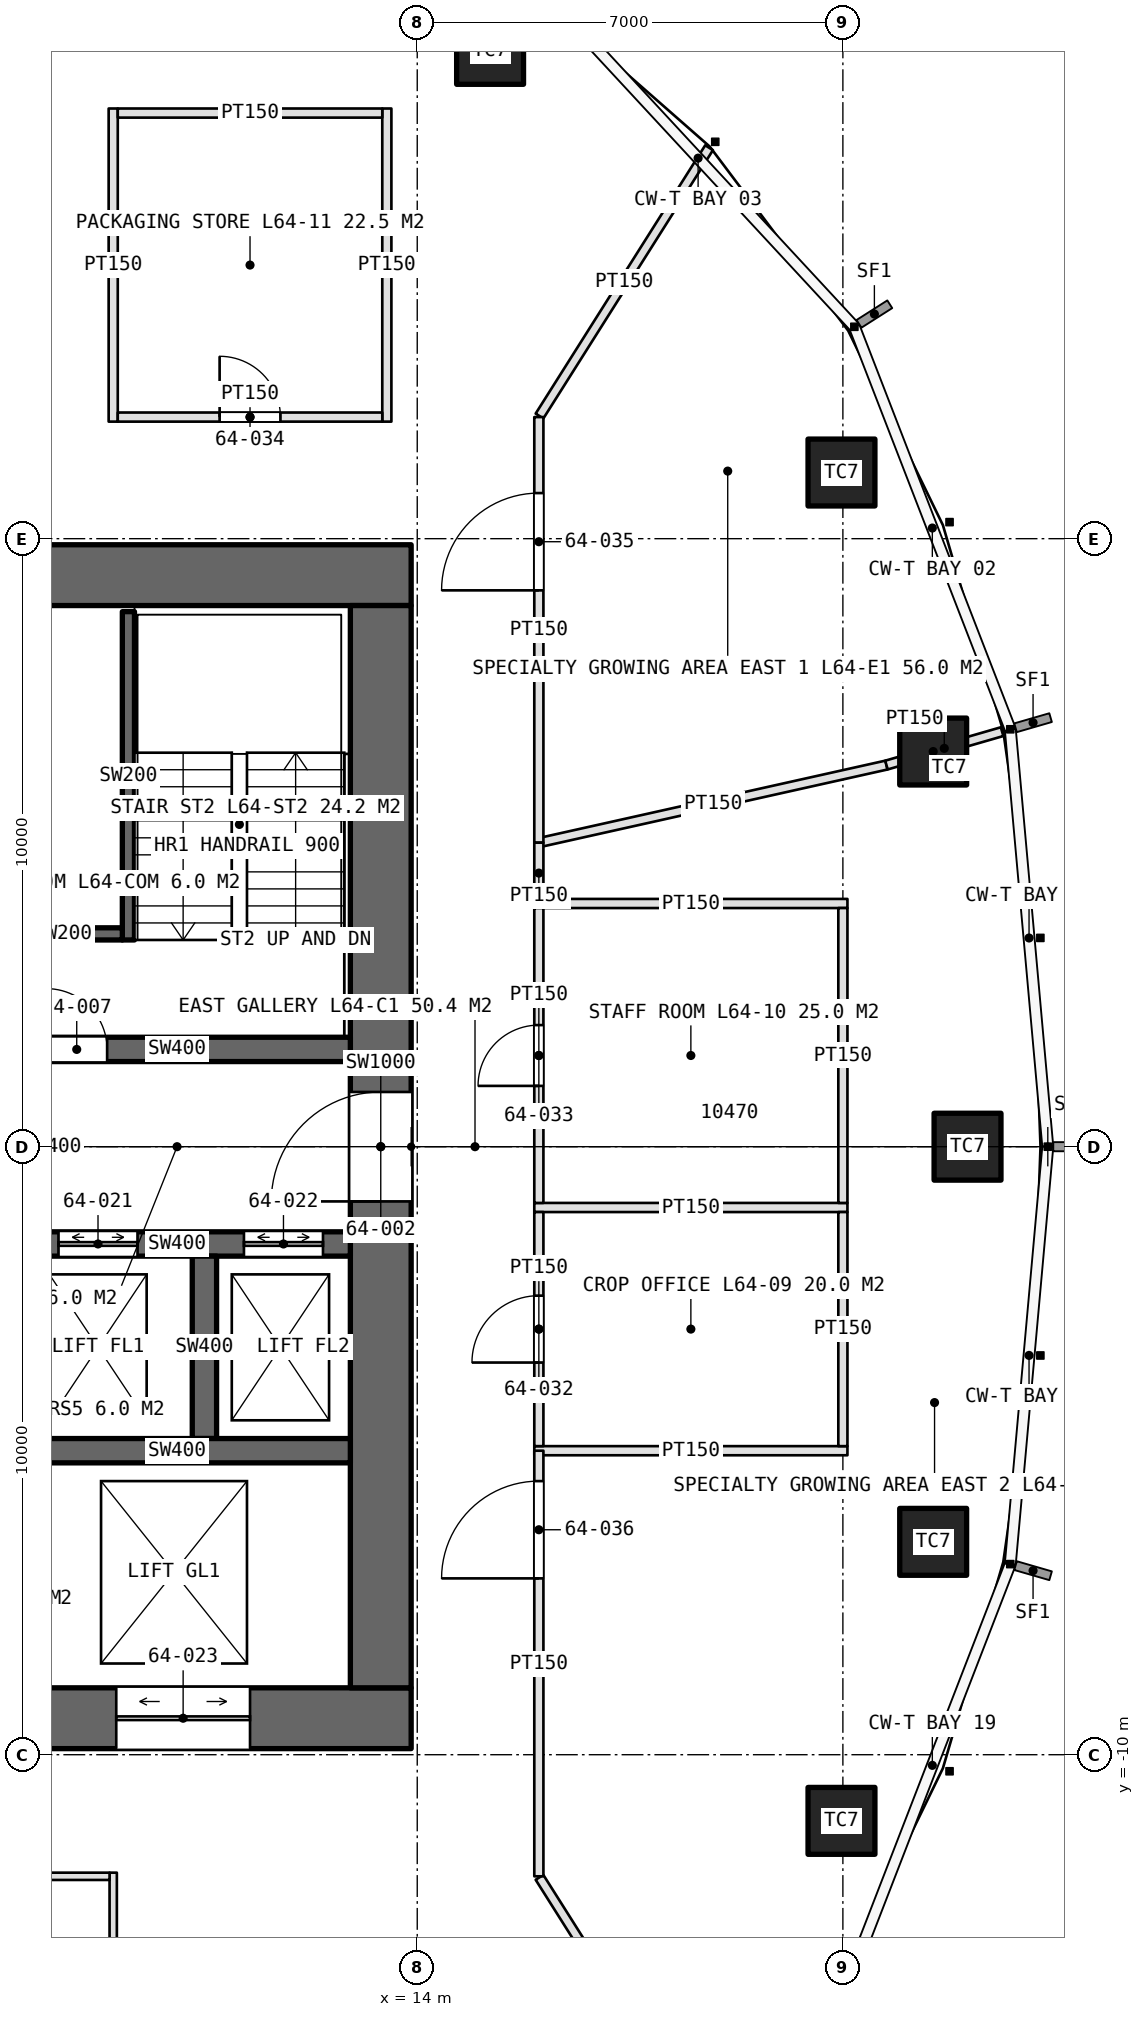
"""IFC4 building model, lengths in metres.
Left out: names, types, materials, properties, quantities, classifications, styles, units other than length and angle.
Written with IfcOpenShell. Run it as: python <this file> out.ifc"""

import sys

from ifc_helpers import new_model, si_unit, direction, frame, frame_2d, origin, origin_2d, place, context, subcontext, project, spatial, rectangle, extrude, element, fill, save


model = new_model("IFC4")
c1 = context("Model", 3, precision=1e-05, world=origin(), true_north=direction((0.0, 1.0)))
c2 = subcontext(c1, "Body", "Model", "MODEL_VIEW")
j1 = project(units=[si_unit("LENGTHUNIT", "METRE"), si_unit("PLANEANGLEUNIT", "RADIAN")], contexts=[c1])
p1 = place(None, origin())
s1 = spatial("IfcSite", under=j1, at=p1, CompositionType="ELEMENT")
p2 = place(p1, origin())
s2 = spatial("IfcBuilding", under=s1, at=p2, CompositionType="ELEMENT")
p3 = place(p2, frame((0.0, 0.0, 288.0)))
s3 = spatial("IfcBuildingStorey", under=s2, at=p3, CompositionType="ELEMENT", Elevation=288.0)
p4 = place(p3, frame((-13.9, -9.4, 0.0), z_axis=(0.0, 0.0, 1.0), x_axis=(1.0, 0.0, 0.0)))
e1 = element("IfcWall", 1, at=p4, inside=s3, PredefinedType="SHEAR", context=c2, shape_type="SweptSolid", body=[
    extrude(rectangle(XDim=27.8, YDim=1.0, at=frame_2d((13.9, 0.0))), origin(), (0.0, 0.0, 1.0), 4.2),
])
p5 = place(p4, frame((22.95, 0.0, 0.0)))
e2 = element("IfcOpeningElement", 2, at=p5, cuts=e1, PredefinedType="OPENING", context=c2, shape_type="SweptSolid", body=[
    extrude(rectangle(XDim=2.2, YDim=2.7, at=frame_2d((1.1, 1.35))), frame((0.0, 0.51, 0.0), z_axis=(0.0, -1.0, 0.0), x_axis=(1.0, 0.0, 0.0)), (0.0, 0.0, 1.0), 1.02),
])
p6 = place(p3, frame((13.9, 9.4, 0.0), z_axis=(0.0, 0.0, 1.0), x_axis=(-1.0, 0.0, 0.0)))
e3 = element("IfcWall", 3, at=p6, inside=s3, PredefinedType="SHEAR", context=c2, shape_type="SweptSolid", body=[
    extrude(rectangle(XDim=27.8, YDim=1.0, at=frame_2d((13.9, 0.0))), origin(), (0.0, 0.0, 1.0), 4.2),
])
p7 = place(p6, frame((23.9, 0.0, 0.0)))
e4 = element("IfcOpeningElement", 4, at=p7, cuts=e3, PredefinedType="OPENING", context=c2, shape_type="SweptSolid", body=[
    extrude(rectangle(XDim=1.0, YDim=2.4, at=frame_2d((0.5, 1.2))), frame((0.0, 0.51, 0.0), z_axis=(0.0, -1.0, 0.0), x_axis=(1.0, 0.0, 0.0)), (0.0, 0.0, 1.0), 1.02),
])
p8 = place(p6, frame((13.0, 0.0, 0.0)))
e5 = element("IfcOpeningElement", 5, at=p8, cuts=e3, PredefinedType="OPENING", context=c2, shape_type="SweptSolid", body=[
    extrude(rectangle(XDim=1.8, YDim=2.4, at=frame_2d((0.9, 1.2))), frame((0.0, 0.51, 0.0), z_axis=(0.0, -1.0, 0.0), x_axis=(1.0, 0.0, 0.0)), (0.0, 0.0, 1.0), 1.02),
])
p9 = place(p3, frame((13.4, -8.9, 0.0), z_axis=(0.0, 0.0, 1.0), x_axis=(0.0, 1.0, 0.0)))
e6 = element("IfcWall", 6, at=p9, inside=s3, PredefinedType="SHEAR", context=c2, shape_type="SweptSolid", body=[
    extrude(rectangle(XDim=17.8, YDim=1.0, at=frame_2d((8.9, 0.0))), origin(), (0.0, 0.0, 1.0), 4.2),
])
p10 = place(p9, frame((8.0, 0.0, 0.0)))
e7 = element("IfcOpeningElement", 7, at=p10, cuts=e6, PredefinedType="OPENING", context=c2, shape_type="SweptSolid", body=[
    extrude(rectangle(XDim=1.8, YDim=2.4, at=frame_2d((0.9, 1.2))), frame((0.0, 0.51, 0.0), z_axis=(0.0, -1.0, 0.0), x_axis=(1.0, 0.0, 0.0)), (0.0, 0.0, 1.0), 1.02),
])
p11 = place(p3, frame((7.2, 1.6, 0.0), z_axis=(0.0, 0.0, 1.0), x_axis=(1.0, 0.0, 0.0)))
e8 = element("IfcWall", 8, at=p11, inside=s3, PredefinedType="SHEAR", context=c2, shape_type="SweptSolid", body=[
    extrude(rectangle(XDim=5.7, YDim=0.4, at=frame_2d((2.85, 0.0))), origin(), (0.0, 0.0, 1.0), 4.2),
])
p12 = place(p11, frame((0.7, 0.0, 0.0)))
e9 = element("IfcOpeningElement", 9, at=p12, cuts=e8, PredefinedType="OPENING", context=c2, shape_type="SweptSolid", body=[
    extrude(rectangle(XDim=1.0, YDim=2.4, at=frame_2d((0.5, 1.2))), frame((0.0, 0.21, 0.0), z_axis=(0.0, -1.0, 0.0), x_axis=(1.0, 0.0, 0.0)), (0.0, 0.0, 1.0), 0.42),
])
p13 = place(p3, frame((7.2, -1.6, 0.0), z_axis=(0.0, 0.0, 1.0), x_axis=(1.0, 0.0, 0.0)))
e10 = element("IfcWall", 10, at=p13, inside=s3, PredefinedType="SHEAR", context=c2, shape_type="SweptSolid", body=[
    extrude(rectangle(XDim=5.7, YDim=0.4, at=frame_2d((2.85, 0.0))), origin(), (0.0, 0.0, 1.0), 4.2),
])
p14 = place(p13, frame((0.9, 0.0, 0.0)))
e11 = element("IfcOpeningElement", 11, at=p14, cuts=e10, PredefinedType="OPENING", context=c2, shape_type="SweptSolid", body=[
    extrude(rectangle(XDim=1.3, YDim=2.4, at=frame_2d((0.65, 1.2))), frame((0.0, 0.21, 0.0), z_axis=(0.0, -1.0, 0.0), x_axis=(1.0, 0.0, 0.0)), (0.0, 0.0, 1.0), 0.42),
])
p15 = place(p13, frame((3.95, 0.0, 0.0)))
e12 = element("IfcOpeningElement", 12, at=p15, cuts=e10, PredefinedType="OPENING", context=c2, shape_type="SweptSolid", body=[
    extrude(rectangle(XDim=1.3, YDim=2.4, at=frame_2d((0.65, 1.2))), frame((0.0, 0.21, 0.0), z_axis=(0.0, -1.0, 0.0), x_axis=(1.0, 0.0, 0.0)), (0.0, 0.0, 1.0), 0.42),
])
p16 = place(p3, frame((10.5, -4.8, 0.0), z_axis=(0.0, 0.0, 1.0), x_axis=(0.0, 1.0, 0.0)))
e13 = element("IfcWall", 13, at=p16, inside=s3, PredefinedType="SHEAR", context=c2, shape_type="SweptSolid", body=[
    extrude(rectangle(XDim=3.0, YDim=0.4, at=frame_2d((1.5, 0.0))), origin(), (0.0, 0.0, 1.0), 4.2),
])
p17 = place(p3, frame((7.2, -5.0, 0.0), z_axis=(0.0, 0.0, 1.0), x_axis=(1.0, 0.0, 0.0)))
e14 = element("IfcWall", 14, at=p17, inside=s3, PredefinedType="SHEAR", context=c2, shape_type="SweptSolid", body=[
    extrude(rectangle(XDim=5.7, YDim=0.4, at=frame_2d((2.85, 0.0))), origin(), (0.0, 0.0, 1.0), 4.2),
])
for number, where, z_axis, x_axis in (
    (15, (23.05, 0.0, 0.0), (0.0, 0.0, 1.0), (1.0, 0.0, 0.0)),
    (16, (22.485, 6.499, 0.0), (0.0, 0.0, 1.0), (1.0, 0.0, 0.0)),
    (17, (20.977, 11.088, 0.0), (0.0, 0.0, 1.0), (1.0, 0.0, 0.0)),
    (18, (15.198, 18.023, 0.0), (0.0, 0.0, 1.0), (1.0, 0.0, 0.0)),
    (19, (20.977, -11.088, 0.0), (0.0, 0.0, 1.0), (1.0, 0.0, 0.0)),
    (20, (22.485, -6.499, 0.0), (0.0, 0.0, 1.0), (1.0, 0.0, 0.0)),
):
    element("IfcColumn", number, at=place(p3, frame(where, z_axis=z_axis, x_axis=x_axis)), inside=s3, PredefinedType="COLUMN", context=c2, shape_type="SweptSolid", body=[
        extrude(rectangle(XDim=1.1, YDim=1.1, at=origin_2d()), origin(), (0.0, 0.0, 1.0), 4.2),
    ])
p18 = place(p3, frame((9.25, 3.4, 0.0), z_axis=(0.0, 0.0, 1.0), x_axis=(0.0, 1.0, 0.0)))
e21 = element("IfcWall", 21, at=p18, inside=s3, PredefinedType="SOLIDWALL", context=c2, shape_type="SweptSolid", body=[
    extrude(rectangle(XDim=5.4, YDim=0.2, at=frame_2d((2.7, 0.0))), origin(), (0.0, 0.0, 1.0), 4.2),
])
p19 = place(p3, frame((9.15, 3.5, 0.0), z_axis=(0.0, 0.0, 1.0), x_axis=(-1.0, 0.0, 0.0)))
e22 = element("IfcWall", 22, at=p19, inside=s3, PredefinedType="SOLIDWALL", context=c2, shape_type="SweptSolid", body=[
    extrude(rectangle(XDim=1.95, YDim=0.2, at=frame_2d((0.975, 0.0))), origin(), (0.0, 0.0, 1.0), 4.2),
])
p20 = place(p3, frame((9.0, -11.94, 0.0), z_axis=(0.0, 0.0, 1.0), x_axis=(0.0, -1.0, 0.0)))
e23 = element("IfcWall", 23, at=p20, inside=s3, PredefinedType="PARTITIONING", context=c2, shape_type="SweptSolid", body=[
    extrude(rectangle(XDim=5.12, YDim=0.12, at=frame_2d((2.56, 0.0))), origin(), (0.0, 0.0, 1.0), 3.0),
])
p21 = place(p3, frame((4.06, -12.0, 0.0), z_axis=(0.0, 0.0, 1.0), x_axis=(1.0, 0.0, 0.0)))
e24 = element("IfcWall", 24, at=p21, inside=s3, PredefinedType="PARTITIONING", context=c2, shape_type="SweptSolid", body=[
    extrude(rectangle(XDim=4.88, YDim=0.12, at=frame_2d((2.44, 0.0))), origin(), (0.0, 0.0, 1.0), 3.0),
])
p22 = place(p21, frame((1.69, 0.0, 0.0)))
e25 = element("IfcOpeningElement", 25, at=p22, cuts=e24, PredefinedType="OPENING", context=c2, shape_type="SweptSolid", body=[
    extrude(rectangle(XDim=1.5, YDim=2.5, at=frame_2d((0.75, 1.25))), frame((0.0, 0.07, 0.0), z_axis=(0.0, -1.0, 0.0), x_axis=(1.0, 0.0, 0.0)), (0.0, 0.0, 1.0), 0.14),
])
for number, where, z_axis, x_axis in (
    (26, (15.925, -5.0, 0.0), (0.0, 0.0, 1.0), (1.0, 0.0, 0.0)),
    (27, (15.925, -1.0, 0.0), (0.0, 0.0, 1.0), (1.0, 0.0, 0.0)),
    (28, (15.925, 4.0, 0.0), (0.0, 0.0, 1.0), (1.0, 0.0, 0.0)),
):
    element("IfcWall", number, at=place(p3, frame(where, z_axis=z_axis, x_axis=x_axis)), inside=s3, PredefinedType="PARTITIONING", context=c2, shape_type="SweptSolid", body=[
        extrude(rectangle(XDim=5.15, YDim=0.15, at=frame_2d((2.575, 0.0))), origin(), (0.0, 0.0, 1.0), 3.0),
    ])
p23 = place(p3, frame((16.0, -4.925, 0.0), z_axis=(0.0, 0.0, 1.0), x_axis=(0.0, 1.0, 0.0)))
e29 = element("IfcWall", 29, at=p23, inside=s3, PredefinedType="PARTITIONING", context=c2, shape_type="SweptSolid", body=[
    extrude(rectangle(XDim=3.85, YDim=0.15, at=frame_2d((1.925, 0.0))), origin(), (0.0, 0.0, 1.0), 3.0),
])
p24 = place(p23, frame((1.375, 0.0, 0.0)))
e30 = element("IfcOpeningElement", 30, at=p24, cuts=e29, PredefinedType="OPENING", context=c2, shape_type="SweptSolid", body=[
    extrude(rectangle(XDim=1.1, YDim=2.3, at=frame_2d((0.55, 1.15))), frame((0.0, 0.085, 0.0), z_axis=(0.0, -1.0, 0.0), x_axis=(1.0, 0.0, 0.0)), (0.0, 0.0, 1.0), 0.17),
])
p25 = place(p3, frame((21.0, -4.925, 0.0), z_axis=(0.0, 0.0, 1.0), x_axis=(0.0, 1.0, 0.0)))
e31 = element("IfcWall", 31, at=p25, inside=s3, PredefinedType="PARTITIONING", context=c2, shape_type="SweptSolid", body=[
    extrude(rectangle(XDim=3.85, YDim=0.15, at=frame_2d((1.925, 0.0))), origin(), (0.0, 0.0, 1.0), 3.0),
])
p26 = place(p3, frame((16.0, -0.925, 0.0), z_axis=(0.0, 0.0, 1.0), x_axis=(0.0, 1.0, 0.0)))
e32 = element("IfcWall", 32, at=p26, inside=s3, PredefinedType="PARTITIONING", context=c2, shape_type="SweptSolid", body=[
    extrude(rectangle(XDim=4.85, YDim=0.15, at=frame_2d((2.425, 0.0))), origin(), (0.0, 0.0, 1.0), 3.0),
])
p27 = place(p26, frame((1.925, 0.0, 0.0)))
e33 = element("IfcOpeningElement", 33, at=p27, cuts=e32, PredefinedType="OPENING", context=c2, shape_type="SweptSolid", body=[
    extrude(rectangle(XDim=1.0, YDim=2.2, at=frame_2d((0.5, 1.1))), frame((0.0, 0.085, 0.0), z_axis=(0.0, -1.0, 0.0), x_axis=(1.0, 0.0, 0.0)), (0.0, 0.0, 1.0), 0.17),
])
p28 = place(p3, frame((21.0, -0.925, 0.0), z_axis=(0.0, 0.0, 1.0), x_axis=(0.0, 1.0, 0.0)))
e34 = element("IfcWall", 34, at=p28, inside=s3, PredefinedType="PARTITIONING", context=c2, shape_type="SweptSolid", body=[
    extrude(rectangle(XDim=4.85, YDim=0.15, at=frame_2d((2.425, 0.0))), origin(), (0.0, 0.0, 1.0), 3.0),
])
for number, where, z_axis, x_axis in (
    (35, (9.0, 11.925, 0.0), (0.0, 0.0, 1.0), (0.0, 1.0, 0.0)),
    (36, (13.5, 11.925, 0.0), (0.0, 0.0, 1.0), (0.0, 1.0, 0.0)),
):
    element("IfcWall", number, at=place(p3, frame(where, z_axis=z_axis, x_axis=x_axis)), inside=s3, PredefinedType="PARTITIONING", context=c2, shape_type="SweptSolid", body=[
        extrude(rectangle(XDim=5.15, YDim=0.15, at=frame_2d((2.575, 0.0))), origin(), (0.0, 0.0, 1.0), 3.0),
    ])
p29 = place(p3, frame((9.075, 12.0, 0.0), z_axis=(0.0, 0.0, 1.0), x_axis=(1.0, 0.0, 0.0)))
e37 = element("IfcWall", 37, at=p29, inside=s3, PredefinedType="PARTITIONING", context=c2, shape_type="SweptSolid", body=[
    extrude(rectangle(XDim=4.35, YDim=0.15, at=frame_2d((2.175, 0.0))), origin(), (0.0, 0.0, 1.0), 3.0),
])
p30 = place(p29, frame((1.675, 0.0, 0.0)))
e38 = element("IfcOpeningElement", 38, at=p30, cuts=e37, PredefinedType="OPENING", context=c2, shape_type="SweptSolid", body=[
    extrude(rectangle(XDim=1.0, YDim=2.2, at=frame_2d((0.5, 1.1))), frame((0.0, 0.085, 0.0), z_axis=(0.0, -1.0, 0.0), x_axis=(1.0, 0.0, 0.0)), (0.0, 0.0, 1.0), 0.17),
])
p31 = place(p3, frame((9.075, 17.0, 0.0), z_axis=(0.0, 0.0, 1.0), x_axis=(1.0, 0.0, 0.0)))
e39 = element("IfcWall", 39, at=p31, inside=s3, PredefinedType="PARTITIONING", context=c2, shape_type="SweptSolid", body=[
    extrude(rectangle(XDim=4.35, YDim=0.15, at=frame_2d((2.175, 0.0))), origin(), (0.0, 0.0, 1.0), 3.0),
])
for number, where, z_axis, x_axis in (
    (40, (16.011, -12.017, 0.0), (0.0, 0.0, 1.0), (0.534, -0.845, 0.0)),
    (41, (16.011, 12.017, 0.0), (0.0, 0.0, 1.0), (0.534, 0.845, 0.0)),
):
    element("IfcWall", number, at=place(p3, frame(where, z_axis=z_axis, x_axis=x_axis)), inside=s3, PredefinedType="PARTITIONING", context=c2, shape_type="SweptSolid", body=[
        extrude(rectangle(XDim=5.22, YDim=0.15, at=frame_2d((2.61, 0.0))), origin(), (0.0, 0.0, 1.0), 3.0),
    ])
p32 = place(p3, frame((16.02, 5.004, 0.0), z_axis=(0.0, 0.0, 1.0), x_axis=(0.975955215335, 0.217971139513, 0.0)))
e42 = element("IfcWall", 42, at=p32, inside=s3, PredefinedType="PARTITIONING", context=c2, shape_type="SweptSolid", body=[
    extrude(rectangle(XDim=5.837, YDim=0.15, at=frame_2d((2.918, 0.0))), origin(), (0.0, 0.0, 1.0), 3.0),
])
p33 = place(p3, frame((21.716, 6.277, 0.0), z_axis=(0.0, 0.0, 1.0), x_axis=(0.960705414675, 0.277570002366, 0.0)))
e43 = element("IfcWall", 43, at=p33, inside=s3, PredefinedType="PARTITIONING", context=c2, shape_type="SweptSolid", body=[
    extrude(rectangle(XDim=1.98, YDim=0.15, at=frame_2d((0.99, 0.0))), origin(), (0.0, 0.0, 1.0), 3.0),
])
p34 = place(p3, frame((16.0, 5.0, 0.0), z_axis=(0.0, 0.0, 1.0), x_axis=(0.0, 1.0, 0.0)))
e44 = element("IfcWall", 44, at=p34, inside=s3, PredefinedType="PARTITIONING", context=c2, shape_type="SweptSolid", body=[
    extrude(rectangle(XDim=7.0, YDim=0.15, at=frame_2d((3.5, 0.0))), origin(), (0.0, 0.0, 1.0), 3.0),
])
p35 = place(p34, frame((4.15, 0.0, 0.0)))
e45 = element("IfcOpeningElement", 45, at=p35, cuts=e44, PredefinedType="OPENING", context=c2, shape_type="SweptSolid", body=[
    extrude(rectangle(XDim=1.6, YDim=2.4, at=frame_2d((0.8, 1.2))), frame((0.0, 0.085, 0.0), z_axis=(0.0, -1.0, 0.0), x_axis=(1.0, 0.0, 0.0)), (0.0, 0.0, 1.0), 0.17),
])
p36 = place(p3, frame((16.0, -12.0, 0.0), z_axis=(0.0, 0.0, 1.0), x_axis=(0.0, 1.0, 0.0)))
e46 = element("IfcWall", 46, at=p36, inside=s3, PredefinedType="PARTITIONING", context=c2, shape_type="SweptSolid", body=[
    extrude(rectangle(XDim=7.0, YDim=0.15, at=frame_2d((3.5, 0.0))), origin(), (0.0, 0.0, 1.0), 3.0),
])
p37 = place(p36, frame((4.9, 0.0, 0.0)))
e47 = element("IfcOpeningElement", 47, at=p37, cuts=e46, PredefinedType="OPENING", context=c2, shape_type="SweptSolid", body=[
    extrude(rectangle(XDim=1.6, YDim=2.4, at=frame_2d((0.8, 1.2))), frame((0.0, 0.085, 0.0), z_axis=(0.0, -1.0, 0.0), x_axis=(1.0, 0.0, 0.0)), (0.0, 0.0, 1.0), 0.17),
])
p38 = place(p3, frame((16.0, 4.0, 0.0), z_axis=(0.0, 0.0, 1.0), x_axis=(0.0, 1.0, 0.0)))
e48 = element("IfcWall", 48, at=p38, inside=s3, PredefinedType="PARTITIONING", context=c2, shape_type="SweptSolid", body=[
    extrude(rectangle(XDim=1.0, YDim=0.15, at=frame_2d((0.5, 0.0))), origin(), (0.0, 0.0, 1.0), 3.0),
])
p39 = place(p10, origin())
e49 = element("IfcDoor", 49, at=p39, inside=s3, OperationType="DOUBLE_DOOR_SINGLE_SWING", PredefinedType="DOOR", context=c2, shape_type="SweptSolid", body=[
    extrude(rectangle(XDim=1.8, YDim=2.4, at=frame_2d((0.9, 1.2))), frame((0.0, 0.025, 0.0), z_axis=(0.0, -1.0, 0.0), x_axis=(1.0, 0.0, 0.0)), (0.0, 0.0, 1.0), 0.05),
])
fill(e7, e49)
p40 = place(p12, origin())
e50 = element("IfcDoor", 50, at=p40, inside=s3, OperationType="SINGLE_SWING_LEFT", PredefinedType="DOOR", context=c2, shape_type="SweptSolid", body=[
    extrude(rectangle(XDim=1.0, YDim=2.4, at=frame_2d((0.5, 1.2))), frame((0.0, 0.025, 0.0), z_axis=(0.0, -1.0, 0.0), x_axis=(1.0, 0.0, 0.0)), (0.0, 0.0, 1.0), 0.05),
])
fill(e9, e50)
p41 = place(p14, origin())
e51 = element("IfcDoor", 51, at=p41, inside=s3, OperationType="DOUBLE_DOOR_SLIDING", PredefinedType="DOOR", context=c2, shape_type="SweptSolid", body=[
    extrude(rectangle(XDim=1.3, YDim=2.4, at=frame_2d((0.65, 1.2))), frame((0.0, 0.025, 0.0), z_axis=(0.0, -1.0, 0.0), x_axis=(1.0, 0.0, 0.0)), (0.0, 0.0, 1.0), 0.05),
])
fill(e11, e51)
p42 = place(p15, origin())
e52 = element("IfcDoor", 52, at=p42, inside=s3, OperationType="DOUBLE_DOOR_SLIDING", PredefinedType="DOOR", context=c2, shape_type="SweptSolid", body=[
    extrude(rectangle(XDim=1.3, YDim=2.4, at=frame_2d((0.65, 1.2))), frame((0.0, 0.025, 0.0), z_axis=(0.0, -1.0, 0.0), x_axis=(1.0, 0.0, 0.0)), (0.0, 0.0, 1.0), 0.05),
])
fill(e12, e52)
p43 = place(p5, origin())
e53 = element("IfcDoor", 53, at=p43, inside=s3, OperationType="DOUBLE_DOOR_SLIDING", PredefinedType="DOOR", context=c2, shape_type="SweptSolid", body=[
    extrude(rectangle(XDim=2.2, YDim=2.7, at=frame_2d((1.1, 1.35))), frame((0.0, 0.025, 0.0), z_axis=(0.0, -1.0, 0.0), x_axis=(1.0, 0.0, 0.0)), (0.0, 0.0, 1.0), 0.05),
])
fill(e2, e53)
p44 = place(p24, origin())
e54 = element("IfcDoor", 54, at=p44, inside=s3, OperationType="SINGLE_SWING_LEFT", PredefinedType="DOOR", context=c2, shape_type="SweptSolid", body=[
    extrude(rectangle(XDim=1.1, YDim=2.3, at=frame_2d((0.55, 1.15))), frame((0.0, 0.025, 0.0), z_axis=(0.0, -1.0, 0.0), x_axis=(1.0, 0.0, 0.0)), (0.0, 0.0, 1.0), 0.05),
])
fill(e30, e54)
p45 = place(p27, origin())
e55 = element("IfcDoor", 55, at=p45, inside=s3, OperationType="SINGLE_SWING_LEFT", PredefinedType="DOOR", context=c2, shape_type="SweptSolid", body=[
    extrude(rectangle(XDim=1.0, YDim=2.2, at=frame_2d((0.5, 1.1))), frame((0.0, 0.025, 0.0), z_axis=(0.0, -1.0, 0.0), x_axis=(1.0, 0.0, 0.0)), (0.0, 0.0, 1.0), 0.05),
])
fill(e33, e55)
p46 = place(p30, origin())
e56 = element("IfcDoor", 56, at=p46, inside=s3, OperationType="SINGLE_SWING_LEFT", PredefinedType="DOOR", context=c2, shape_type="SweptSolid", body=[
    extrude(rectangle(XDim=1.0, YDim=2.2, at=frame_2d((0.5, 1.1))), frame((0.0, 0.025, 0.0), z_axis=(0.0, -1.0, 0.0), x_axis=(1.0, 0.0, 0.0)), (0.0, 0.0, 1.0), 0.05),
])
fill(e38, e56)
p47 = place(p35, origin())
e57 = element("IfcDoor", 57, at=p47, inside=s3, OperationType="DOUBLE_DOOR_SINGLE_SWING", PredefinedType="DOOR", context=c2, shape_type="SweptSolid", body=[
    extrude(rectangle(XDim=1.6, YDim=2.4, at=frame_2d((0.8, 1.2))), frame((0.0, 0.025, 0.0), z_axis=(0.0, -1.0, 0.0), x_axis=(1.0, 0.0, 0.0)), (0.0, 0.0, 1.0), 0.05),
])
fill(e45, e57)
p48 = place(p37, origin())
e58 = element("IfcDoor", 58, at=p48, inside=s3, OperationType="DOUBLE_DOOR_SINGLE_SWING", PredefinedType="DOOR", context=c2, shape_type="SweptSolid", body=[
    extrude(rectangle(XDim=1.6, YDim=2.4, at=frame_2d((0.8, 1.2))), frame((0.0, 0.025, 0.0), z_axis=(0.0, -1.0, 0.0), x_axis=(1.0, 0.0, 0.0)), (0.0, 0.0, 1.0), 0.05),
])
fill(e47, e58)
save(model, sys.argv[1])
